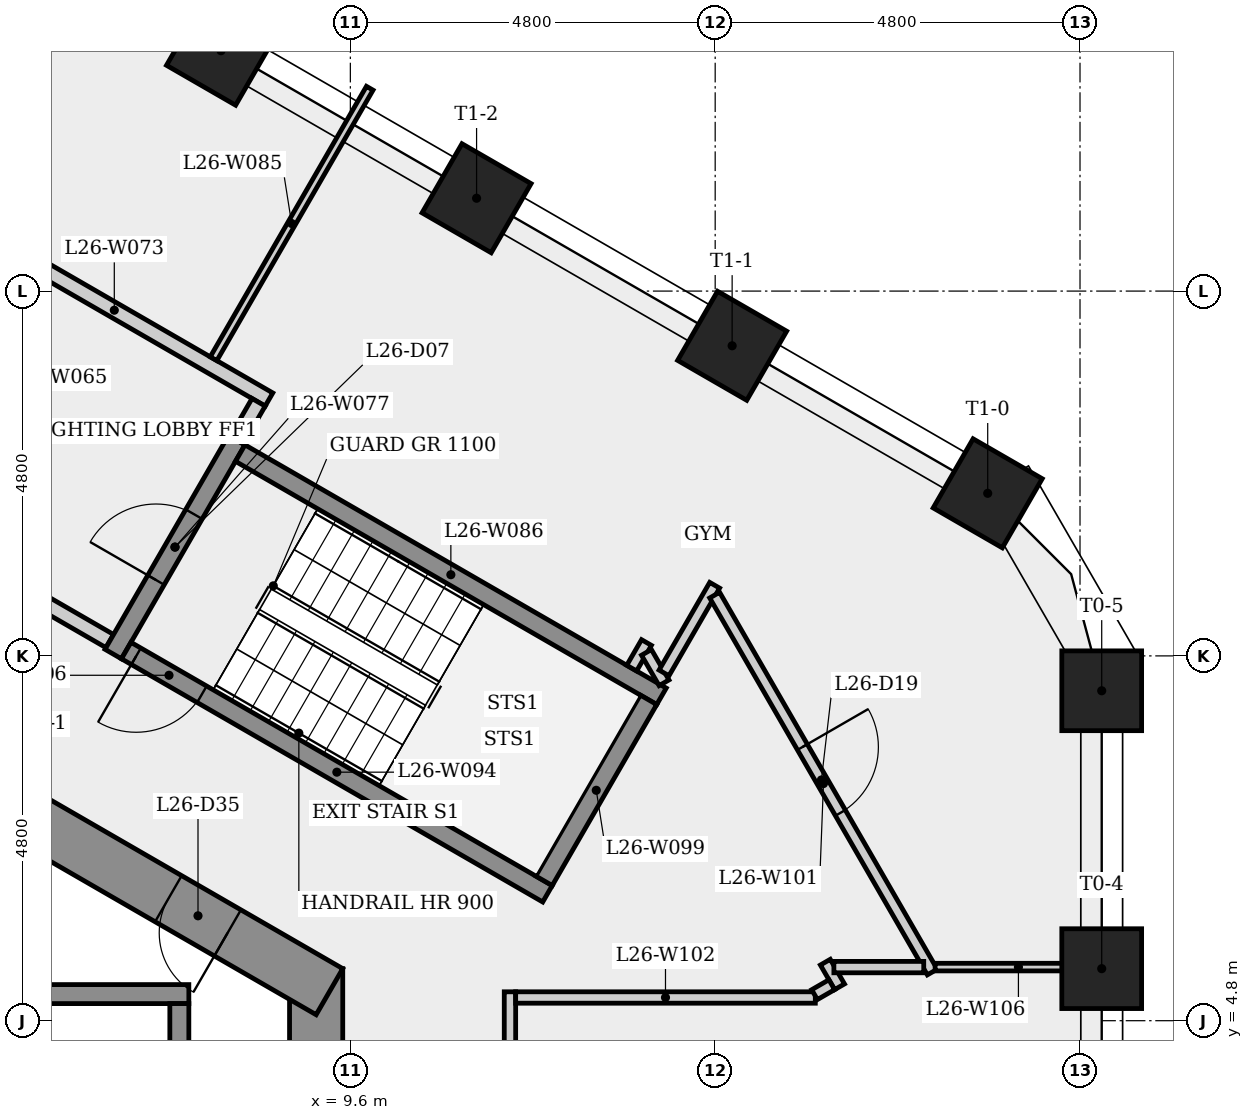
"""IFC4 building model, lengths in metres.
Left out: names, types, materials, properties, quantities, classifications, styles, units other than length and angle.
Written with IfcOpenShell. Run it as: python <this file> out.ifc"""

import sys

from ifc_helpers import new_model, si_unit, direction, frame, frame_2d, origin, origin_2d, place, context, subcontext, project, spatial, rectangle, extrude, element, fill, save


model = new_model("IFC4")
c1 = context("Model", 3, precision=1e-05, world=origin(), true_north=direction((0.0, 1.0)))
c2 = subcontext(c1, "Body", "Model", "MODEL_VIEW")
j1 = project(units=[si_unit("LENGTHUNIT", "METRE"), si_unit("PLANEANGLEUNIT", "RADIAN")], contexts=[c1])
p1 = place(None, origin())
s1 = spatial("IfcSite", under=j1, at=p1, CompositionType="ELEMENT")
p2 = place(p1, origin())
s2 = spatial("IfcBuilding", under=s1, at=p2, CompositionType="ELEMENT")
p3 = place(p2, frame((0.0, 0.0, 100.1)))
s3 = spatial("IfcBuildingStorey", under=s2, at=p3, CompositionType="ELEMENT", Elevation=100.1)
p4 = place(p3, frame((9.15, -5.485, 0.0), z_axis=(0.0, 0.0, 1.0), x_axis=(0.0, 1.0, 0.0)))
e1 = element("IfcWall", 1, at=p4, inside=s3, PredefinedType="SHEAR", context=c2, shape_type="SweptSolid", body=[
    extrude(rectangle(XDim=10.97, YDim=0.7, at=frame_2d((5.485, 0.0))), origin(), (0.0, 0.0, 1.0), 3.4),
])
p5 = place(p4, frame((4.685, 0.0, 0.0)))
e2 = element("IfcOpeningElement", 2, at=p5, cuts=e1, PredefinedType="OPENING", context=c2, shape_type="SweptSolid", body=[
    extrude(rectangle(XDim=1.6, YDim=2.1, at=frame_2d((0.8, 1.05))), frame((0.0, 0.36, 0.0), z_axis=(0.0, -1.0, 0.0), x_axis=(1.0, 0.0, 0.0)), (0.0, 0.0, 1.0), 0.72),
])
p6 = place(p3, frame((9.325, 5.182, 0.0), z_axis=(0.0, 0.0, 1.0), x_axis=(-0.866023993627, 0.500002442456, 0.0)))
e3 = element("IfcWall", 3, at=p6, inside=s3, PredefinedType="SHEAR", context=c2, shape_type="SweptSolid", body=[
    extrude(rectangle(XDim=10.97, YDim=0.7, at=frame_2d((5.485, 0.0))), origin(), (0.0, 0.0, 1.0), 3.4),
])
p7 = place(p6, frame((8.267, 0.0, 0.0)))
e4 = element("IfcOpeningElement", 4, at=p7, cuts=e3, PredefinedType="OPENING", context=c2, shape_type="SweptSolid", body=[
    extrude(rectangle(XDim=0.9, YDim=2.1, at=frame_2d((0.45, 1.05))), frame((0.0, 0.36, 0.0), z_axis=(0.0, -1.0, 0.0), x_axis=(1.0, 0.0, 0.0)), (0.0, 0.0, 1.0), 0.72),
])
p8 = place(p6, frame((1.547, 0.0, 0.0)))
e5 = element("IfcOpeningElement", 5, at=p8, cuts=e3, PredefinedType="OPENING", context=c2, shape_type="SweptSolid", body=[
    extrude(rectangle(XDim=0.9, YDim=2.1, at=frame_2d((0.45, 1.05))), frame((0.0, 0.36, 0.0), z_axis=(0.0, -1.0, 0.0), x_axis=(1.0, 0.0, 0.0)), (0.0, 0.0, 1.0), 0.72),
])
for number, where, z_axis, x_axis in (
    (6, (19.486, 5.485, 0.0), (0.0, 0.0, 1.0), (1.0, 0.0, 0.0)),
    (7, (19.486, 9.141, 0.0), (0.0, 0.0, 1.0), (1.0, 0.0, 0.0)),
    (8, (17.986, 11.739, 0.0), (0.0, 0.0, 1.0), (0.5, 0.866, 0.0)),
    (9, (14.623, 13.68, 0.0), (0.0, 0.0, 1.0), (0.5, 0.866, 0.0)),
    (10, (11.261, 15.622, 0.0), (0.0, 0.0, 1.0), (0.5, 0.866, 0.0)),
    (11, (7.898, 17.563, 0.0), (0.0, 0.0, 1.0), (0.5, 0.866, 0.0)),
):
    element("IfcColumn", number, at=place(p3, frame(where, z_axis=z_axis, x_axis=x_axis)), inside=s3, PredefinedType="COLUMN", context=c2, shape_type="SweptSolid", body=[
        extrude(rectangle(XDim=1.05, YDim=1.05, at=origin_2d()), origin(), (0.0, 0.0, 1.0), 3.4),
    ])
p9 = place(p3, frame((-7.225, 5.15, 0.0), z_axis=(0.0, 0.0, 1.0), x_axis=(1.0, 0.0, 0.0)))
e12 = element("IfcWall", 12, at=p9, inside=s3, PredefinedType="SHEAR", context=c2, shape_type="SweptSolid", body=[
    extrude(rectangle(XDim=14.7, YDim=0.25, at=frame_2d((7.35, 0.0))), origin(), (0.0, 0.0, 1.0), 3.05),
])
p10 = place(p3, frame((4.459, 15.323, 0.0), z_axis=(0.0, 0.0, 1.0), x_axis=(0.866016039709, -0.500016218704, 0.0)))
e13 = element("IfcWall", 13, at=p10, inside=s3, PredefinedType="PARTITIONING", context=c2, shape_type="SweptSolid", body=[
    extrude(rectangle(XDim=4.7, YDim=0.2, at=frame_2d((2.35, 0.0))), origin(), (0.0, 0.0, 1.0), 3.05),
])
p11 = place(p3, frame((6.435, 9.795, 0.0), z_axis=(0.0, 0.0, 1.0), x_axis=(-0.866012907634, 0.500021643343, 0.0)))
e14 = element("IfcWall", 14, at=p11, inside=s3, PredefinedType="PARTITIONING", context=c2, shape_type="SweptSolid", body=[
    extrude(rectangle(XDim=4.45, YDim=0.2, at=frame_2d((2.225, 0.0))), origin(), (0.0, 0.0, 1.0), 3.05),
])
p12 = place(p11, frame((1.675, 0.0, 0.0)))
e15 = element("IfcOpeningElement", 15, at=p12, cuts=e14, PredefinedType="OPENING", context=c2, shape_type="SweptSolid", body=[
    extrude(rectangle(XDim=1.1, YDim=2.1, at=frame_2d((0.55, 1.05))), frame((0.0, 0.11, 0.0), z_axis=(0.0, -1.0, 0.0), x_axis=(1.0, 0.0, 0.0)), (0.0, 0.0, 1.0), 0.22),
])
p13 = place(p3, frame((6.48, 9.624, 0.0), z_axis=(0.0, 0.0, 1.0), x_axis=(0.500017246033, 0.866015446554, 0.0)))
e16 = element("IfcWall", 16, at=p13, inside=s3, PredefinedType="SHEAR", context=c2, shape_type="SweptSolid", body=[
    extrude(rectangle(XDim=3.25, YDim=0.25, at=frame_2d((1.625, 0.0))), origin(), (0.0, 0.0, 1.0), 3.05),
])
p14 = place(p13, frame((1.125, 0.0, 0.0)))
e17 = element("IfcOpeningElement", 17, at=p14, cuts=e16, PredefinedType="OPENING", context=c2, shape_type="SweptSolid", body=[
    extrude(rectangle(XDim=1.0, YDim=2.1, at=frame_2d((0.5, 1.05))), frame((0.0, 0.135, 0.0), z_axis=(0.0, -1.0, 0.0), x_axis=(1.0, 0.0, 0.0)), (0.0, 0.0, 1.0), 0.27),
])
p15 = place(p3, frame((7.35, 5.025, 0.0), z_axis=(0.0, 0.0, 1.0), x_axis=(0.0, -1.0, 0.0)))
e18 = element("IfcWall", 18, at=p15, inside=s3, PredefinedType="SHEAR", context=c2, shape_type="SweptSolid", body=[
    extrude(rectangle(XDim=3.1, YDim=0.25, at=frame_2d((1.55, 0.0))), origin(), (0.0, 0.0, 1.0), 3.4),
])
p16 = place(p3, frame((7.8, 13.51, 0.0), z_axis=(0.0, 0.0, 1.0), x_axis=(0.500017276951, 0.866015428702, 0.0)))
e19 = element("IfcWall", 19, at=p16, inside=s3, PredefinedType="PARTITIONING", context=c2, shape_type="SweptSolid", body=[
    extrude(rectangle(XDim=4.11, YDim=0.1, at=frame_2d((2.055, 0.0))), origin(), (0.0, 0.0, 1.0), 3.05),
])
p17 = place(p3, frame((8.151, 12.268, 0.0), z_axis=(0.0, 0.0, 1.0), x_axis=(0.866025499775, -0.499999833739, 0.0)))
e20 = element("IfcWall", 20, at=p17, inside=s3, PredefinedType="SHEAR", context=c2, shape_type="SweptSolid", body=[
    extrude(rectangle(XDim=6.4, YDim=0.25, at=frame_2d((3.2, 0.0))), origin(), (0.0, 0.0, 1.0), 3.05),
])
p18 = place(p3, frame((8.393, 12.937, 0.0), z_axis=(0.0, 0.0, 1.0), x_axis=(-0.500065409566, -0.86598763626, 0.0)))
e21 = element("IfcWall", 21, at=p18, inside=s3, PredefinedType="PARTITIONING", context=c2, shape_type="SweptSolid", body=[
    extrude(rectangle(XDim=0.575, YDim=0.2, at=frame_2d((0.288, 0.0))), origin(), (0.0, 0.0, 1.0), 3.05),
])
p19 = place(p3, frame((11.7, -5.43, 0.0), z_axis=(0.0, 0.0, 1.0), x_axis=(0.0, 1.0, 0.0)))
e22 = element("IfcWall", 22, at=p19, inside=s3, PredefinedType="PARTITIONING", context=c2, shape_type="SweptSolid", body=[
    extrude(rectangle(XDim=10.61, YDim=0.15, at=frame_2d((5.305, 0.0))), origin(), (0.0, 0.0, 1.0), 3.05),
])
p20 = place(p19, frame((6.617, 0.0, 0.0)))
e23 = element("IfcOpeningElement", 23, at=p20, cuts=e22, PredefinedType="OPENING", context=c2, shape_type="SweptSolid", body=[
    extrude(rectangle(XDim=1.0, YDim=2.1, at=frame_2d((0.5, 1.05))), frame((0.0, 0.085, 0.0), z_axis=(0.0, -1.0, 0.0), x_axis=(1.0, 0.0, 0.0)), (0.0, 0.0, 1.0), 0.17),
])
p21 = place(p3, frame((12.194, 6.47, 0.0), z_axis=(0.0, 0.0, 1.0), x_axis=(-0.866025499775, 0.499999833739, 0.0)))
e24 = element("IfcWall", 24, at=p21, inside=s3, PredefinedType="SHEAR", context=c2, shape_type="SweptSolid", body=[
    extrude(rectangle(XDim=6.4, YDim=0.25, at=frame_2d((3.2, 0.0))), origin(), (0.0, 0.0, 1.0), 3.05),
])
p22 = place(p21, frame((5.25, 0.0, 0.0)))
e25 = element("IfcOpeningElement", 25, at=p22, cuts=e24, PredefinedType="OPENING", context=c2, shape_type="SweptSolid", body=[
    extrude(rectangle(XDim=1.0, YDim=2.1, at=frame_2d((0.5, 1.05))), frame((0.0, 0.135, 0.0), z_axis=(0.0, -1.0, 0.0), x_axis=(1.0, 0.0, 0.0)), (0.0, 0.0, 1.0), 0.27),
])
p23 = place(p3, frame((13.302, 9.439, 0.0), z_axis=(0.0, 0.0, 1.0), x_axis=(0.499849133735, 0.866112488944, 0.0)))
e26 = element("IfcWall", 26, at=p23, inside=s3, PredefinedType="PARTITIONING", context=c2, shape_type="SweptSolid", body=[
    extrude(rectangle(XDim=0.389, YDim=0.15, at=frame_2d((0.195, 0.0))), origin(), (0.0, 0.0, 1.0), 3.05),
])
p24 = place(p3, frame((13.496, 9.646, 0.0), z_axis=(0.0, 0.0, 1.0), x_axis=(0.500119048086, -0.865956660429, 0.0)))
e27 = element("IfcWall", 27, at=p24, inside=s3, PredefinedType="PARTITIONING", context=c2, shape_type="SweptSolid", body=[
    extrude(rectangle(XDim=0.462, YDim=0.15, at=frame_2d((0.231, 0.0))), origin(), (0.0, 0.0, 1.0), 3.05),
])
p25 = place(p3, frame((13.523, 9.022, 0.0), z_axis=(0.0, 0.0, 1.0), x_axis=(-0.500034990121, -0.866005201286, 0.0)))
e28 = element("IfcWall", 28, at=p25, inside=s3, PredefinedType="SHEAR", context=c2, shape_type="SweptSolid", body=[
    extrude(rectangle(XDim=2.75, YDim=0.25, at=frame_2d((1.375, 0.0))), origin(), (0.0, 0.0, 1.0), 3.05),
])
p26 = place(p3, frame((13.727, 9.376, 0.0), z_axis=(0.0, 0.0, 1.0), x_axis=(0.500002746266, 0.866023818221, 0.0)))
e29 = element("IfcWall", 29, at=p26, inside=s3, PredefinedType="PARTITIONING", context=c2, shape_type="SweptSolid", body=[
    extrude(rectangle(XDim=1.332, YDim=0.15, at=frame_2d((0.666, 0.0))), origin(), (0.0, 0.0, 1.0), 3.05),
])
p27 = place(p3, frame((14.393, 10.4, 0.0), z_axis=(0.0, 0.0, 1.0), x_axis=(0.499990619765, -0.866030819398, 0.0)))
e30 = element("IfcWall", 30, at=p27, inside=s3, PredefinedType="PARTITIONING", context=c2, shape_type="SweptSolid", body=[
    extrude(rectangle(XDim=5.727, YDim=0.15, at=frame_2d((2.863, 0.0))), origin(), (0.0, 0.0, 1.0), 3.05),
])
p28 = place(p27, frame((2.309, 0.0, 0.0)))
e31 = element("IfcOpeningElement", 31, at=p28, cuts=e30, PredefinedType="OPENING", context=c2, shape_type="SweptSolid", body=[
    extrude(rectangle(XDim=1.0, YDim=2.1, at=frame_2d((0.5, 1.05))), frame((0.0, 0.085, 0.0), z_axis=(0.0, -1.0, 0.0), x_axis=(1.0, 0.0, 0.0)), (0.0, 0.0, 1.0), 0.17),
])
p29 = place(p3, frame((15.717, 5.105, 0.0), z_axis=(0.0, 0.0, 1.0), x_axis=(-1.0, 0.0, 0.0)))
e32 = element("IfcWall", 32, at=p29, inside=s3, PredefinedType="PARTITIONING", context=c2, shape_type="SweptSolid", body=[
    extrude(rectangle(XDim=3.942, YDim=0.15, at=frame_2d((1.971, 0.0))), origin(), (0.0, 0.0, 1.0), 3.05),
])
p30 = place(p3, frame((15.849, 5.57, 0.0), z_axis=(0.0, 0.0, 1.0), x_axis=(0.499929606556, -0.866066041644, 0.0)))
e33 = element("IfcWall", 33, at=p30, inside=s3, PredefinedType="PARTITIONING", context=c2, shape_type="SweptSolid", body=[
    extrude(rectangle(XDim=0.374, YDim=0.15, at=frame_2d((0.187, 0.0))), origin(), (0.0, 0.0, 1.0), 3.05),
])
p31 = place(p3, frame((15.934, 5.273, 0.0), z_axis=(0.0, 0.0, 1.0), x_axis=(-0.865936922628, -0.500153222552, 0.0)))
e34 = element("IfcWall", 34, at=p31, inside=s3, PredefinedType="PARTITIONING", context=c2, shape_type="SweptSolid", body=[
    extrude(rectangle(XDim=0.262, YDim=0.15, at=frame_2d((0.131, 0.0))), origin(), (0.0, 0.0, 1.0), 3.05),
])
p32 = place(p3, frame((17.294, 5.505, 0.0), z_axis=(0.0, 0.0, 1.0), x_axis=(1.0, 0.0, 0.0)))
e35 = element("IfcWall", 35, at=p32, inside=s3, PredefinedType="PARTITIONING", context=c2, shape_type="SweptSolid", body=[
    extrude(rectangle(XDim=2.192, YDim=0.1, at=frame_2d((1.096, 0.0))), origin(), (0.0, 0.0, 1.0), 3.05),
])
p33 = place(p3, frame((17.144, 5.505, 0.0), z_axis=(0.0, 0.0, 1.0), x_axis=(-1.0, 0.0, 0.0)))
e36 = element("IfcWall", 36, at=p33, inside=s3, PredefinedType="PARTITIONING", context=c2, shape_type="SweptSolid", body=[
    extrude(rectangle(XDim=1.182, YDim=0.15, at=frame_2d((0.591, 0.0))), origin(), (0.0, 0.0, 1.0), 3.05),
])
p34 = place(p22, origin())
e37 = element("IfcDoor", 37, at=p34, inside=s3, OperationType="SINGLE_SWING_RIGHT", PredefinedType="DOOR", context=c2, shape_type="SweptSolid", body=[
    extrude(rectangle(XDim=1.0, YDim=2.1, at=frame_2d((0.5, 1.05))), frame((0.0, 0.025, 0.0), z_axis=(0.0, -1.0, 0.0), x_axis=(1.0, 0.0, 0.0)), (0.0, 0.0, 1.0), 0.05),
])
fill(e25, e37)
p35 = place(p14, origin())
e38 = element("IfcDoor", 38, at=p35, inside=s3, OperationType="SINGLE_SWING_LEFT", PredefinedType="DOOR", context=c2, shape_type="SweptSolid", body=[
    extrude(rectangle(XDim=1.0, YDim=2.1, at=frame_2d((0.5, 1.05))), frame((0.0, 0.025, 0.0), z_axis=(0.0, -1.0, 0.0), x_axis=(1.0, 0.0, 0.0)), (0.0, 0.0, 1.0), 0.05),
])
fill(e17, e38)
p36 = place(p28, origin())
e39 = element("IfcDoor", 39, at=p36, inside=s3, OperationType="SINGLE_SWING_LEFT", PredefinedType="DOOR", context=c2, shape_type="SweptSolid", body=[
    extrude(rectangle(XDim=1.0, YDim=2.1, at=frame_2d((0.5, 1.05))), frame((0.0, 0.025, 0.0), z_axis=(0.0, -1.0, 0.0), x_axis=(1.0, 0.0, 0.0)), (0.0, 0.0, 1.0), 0.05),
])
fill(e31, e39)
p37 = place(p8, origin())
e40 = element("IfcDoor", 40, at=p37, inside=s3, OperationType="SINGLE_SWING_LEFT", PredefinedType="DOOR", context=c2, shape_type="SweptSolid", body=[
    extrude(rectangle(XDim=0.9, YDim=2.1, at=frame_2d((0.45, 1.05))), frame((0.0, 0.025, 0.0), z_axis=(0.0, -1.0, 0.0), x_axis=(1.0, 0.0, 0.0)), (0.0, 0.0, 1.0), 0.05),
])
fill(e5, e40)
save(model, sys.argv[1])
